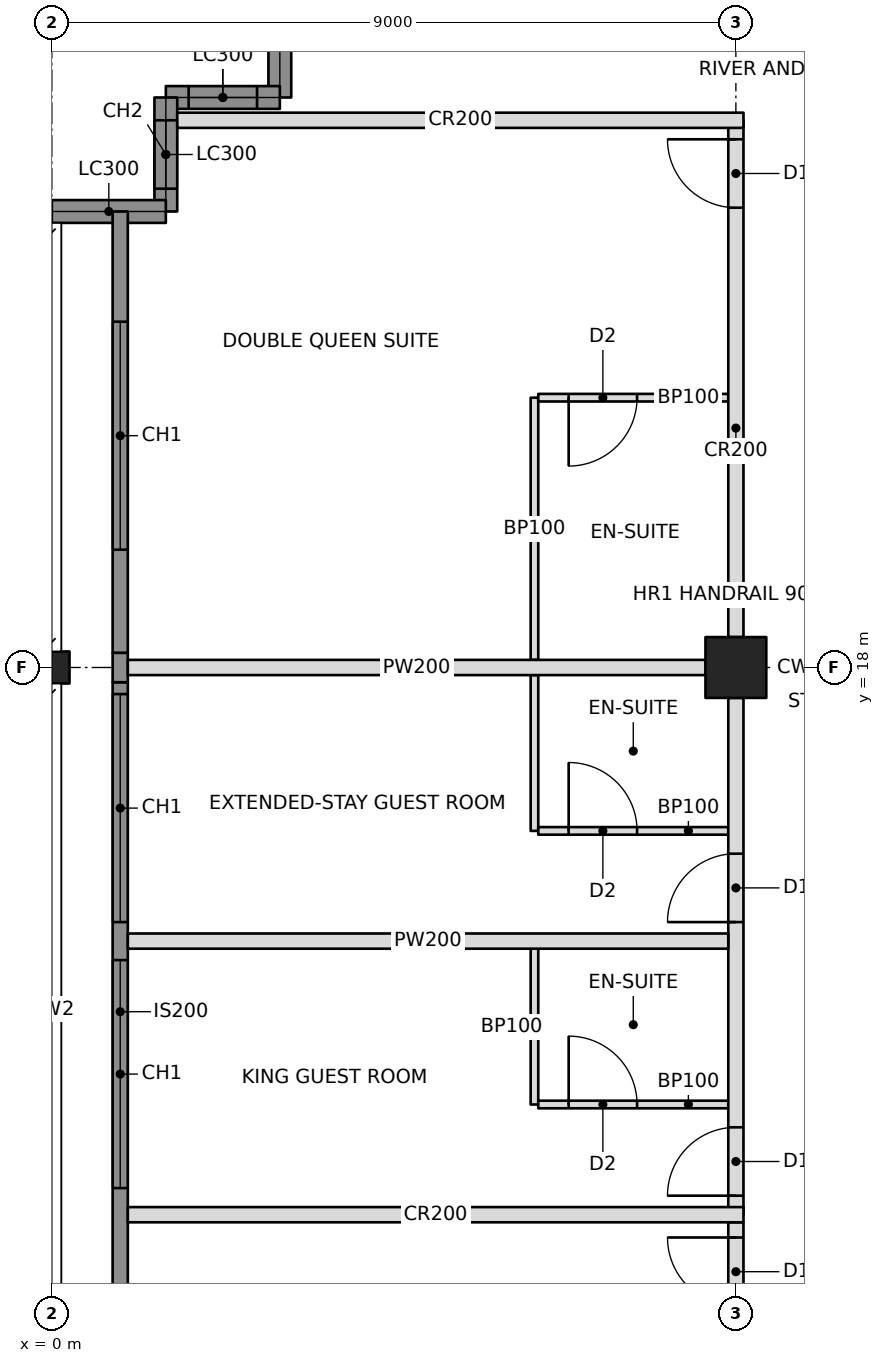
"""IFC4 building model, lengths in metres.
Left out: names, types, materials, properties, quantities, classifications, styles, units other than length and angle.
Written with IfcOpenShell. Run it as: python <this file> out.ifc"""

import sys

from ifc_helpers import new_model, si_unit, direction, frame, frame_2d, origin, origin_2d, place, context, subcontext, project, spatial, rectangle, hollow_rectangle, i_section, extrude, element, fill, save


model = new_model("IFC4")
c1 = context("Model", 3, precision=1e-05, world=origin(), true_north=direction((0.0, 1.0)))
c2 = subcontext(c1, "Body", "Model", "MODEL_VIEW")
j1 = project(units=[si_unit("LENGTHUNIT", "METRE"), si_unit("PLANEANGLEUNIT", "RADIAN")], contexts=[c1])
p1 = place(None, origin())
s1 = spatial("IfcSite", under=j1, at=p1, CompositionType="ELEMENT")
p2 = place(p1, origin())
s2 = spatial("IfcBuilding", under=s1, at=p2, CompositionType="ELEMENT")
p3 = place(p2, frame((0.0, 0.0, 233.8)))
s3 = spatial("IfcBuildingStorey", under=s2, at=p3, CompositionType="ELEMENT", Elevation=233.8)
p4 = place(p3, frame((0.0, 18.0, 0.0), z_axis=(0.0, 0.0, 1.0), x_axis=(0.0, 1.0, 0.0)))
e1 = element("IfcColumn", 1, at=p4, inside=s3, PredefinedType="COLUMN", context=c2, shape_type="SweptSolid", body=[
    extrude(i_section(OverallWidth=0.422, OverallDepth=0.465, WebThickness=0.045, FlangeThickness=0.073, at=origin_2d()), origin(), (0.0, 0.0, 1.0), 3.6),
])
p5 = place(p3, frame((9.0, 18.0, 0.0), z_axis=(0.0, 0.0, 1.0), x_axis=(1.0, 0.0, 0.0)))
e2 = element("IfcColumn", 2, at=p5, inside=s3, PredefinedType="COLUMN", context=c2, shape_type="SweptSolid", body=[
    extrude(hollow_rectangle(XDim=0.8, YDim=0.8, WallThickness=0.04, at=origin_2d()), origin(), (0.0, 0.0, 1.0), 3.6),
])
p6 = place(p3, frame((3.0, 27.0, 0.0), z_axis=(0.0, 0.0, 1.0), x_axis=(0.0, -1.0, 0.0)))
e3 = element("IfcWall", 3, at=p6, inside=s3, PredefinedType="SOLIDWALL", context=c2, shape_type="SweptSolid", body=[
    extrude(rectangle(XDim=1.5, YDim=0.3, at=frame_2d((0.75, 0.0))), origin(), (0.0, 0.0, 1.0), 2.62),
])
p7 = place(p3, frame((3.0, 25.5, 0.0), z_axis=(0.0, 0.0, 1.0), x_axis=(-1.0, 0.0, 0.0)))
e4 = element("IfcWall", 4, at=p7, inside=s3, PredefinedType="SOLIDWALL", context=c2, shape_type="SweptSolid", body=[
    extrude(rectangle(XDim=1.5, YDim=0.3, at=frame_2d((0.75, 0.0))), origin(), (0.0, 0.0, 1.0), 3.4),
])
p8 = place(p7, frame((0.3, 0.0, 0.6)))
e5 = element("IfcOpeningElement", 5, at=p8, cuts=e4, PredefinedType="OPENING", context=c2, shape_type="SweptSolid", body=[
    extrude(rectangle(XDim=0.9, YDim=2.2, at=frame_2d((0.45, 1.1))), frame((0.0, 0.16, 0.0), z_axis=(0.0, -1.0, 0.0), x_axis=(1.0, 0.0, 0.0)), (0.0, 0.0, 1.0), 0.32),
])
p9 = place(p3, frame((1.5, 25.5, 0.0), z_axis=(0.0, 0.0, 1.0), x_axis=(0.0, -1.0, 0.0)))
e6 = element("IfcWall", 6, at=p9, inside=s3, PredefinedType="SOLIDWALL", context=c2, shape_type="SweptSolid", body=[
    extrude(rectangle(XDim=1.5, YDim=0.3, at=frame_2d((0.75, 0.0))), origin(), (0.0, 0.0, 1.0), 3.4),
])
p10 = place(p9, frame((0.3, 0.0, 0.6)))
e7 = element("IfcOpeningElement", 7, at=p10, cuts=e6, PredefinedType="OPENING", context=c2, shape_type="SweptSolid", body=[
    extrude(rectangle(XDim=0.9, YDim=2.2, at=frame_2d((0.45, 1.1))), frame((0.0, 0.16, 0.0), z_axis=(0.0, -1.0, 0.0), x_axis=(1.0, 0.0, 0.0)), (0.0, 0.0, 1.0), 0.32),
])
p11 = place(p3, frame((1.5, 24.0, 0.0), z_axis=(0.0, 0.0, 1.0), x_axis=(-1.0, 0.0, 0.0)))
e8 = element("IfcWall", 8, at=p11, inside=s3, PredefinedType="SOLIDWALL", context=c2, shape_type="SweptSolid", body=[
    extrude(rectangle(XDim=1.5, YDim=0.3, at=frame_2d((0.75, 0.0))), origin(), (0.0, 0.0, 1.0), 2.62),
])
p12 = place(p3, frame((9.0, 10.8, 0.0), z_axis=(0.0, 0.0, 1.0), x_axis=(0.0, 1.0, 0.0)))
e9 = element("IfcWall", 9, at=p12, inside=s3, PredefinedType="PARTITIONING", context=c2, shape_type="SweptSolid", body=[
    extrude(rectangle(XDim=6.8, YDim=0.2, at=frame_2d((3.4, 0.0))), origin(), (0.0, 0.0, 1.0), 2.605),
])
p13 = place(p12, frame((0.25, 0.0, 0.0)))
e10 = element("IfcOpeningElement", 10, at=p13, cuts=e9, PredefinedType="OPENING", context=c2, shape_type="SweptSolid", body=[
    extrude(rectangle(XDim=0.9, YDim=2.1, at=frame_2d((0.45, 1.05))), frame((0.0, 0.11, 0.0), z_axis=(0.0, -1.0, 0.0), x_axis=(1.0, 0.0, 0.0)), (0.0, 0.0, 1.0), 0.22),
])
p14 = place(p12, frame((3.85, 0.0, 0.0)))
e11 = element("IfcOpeningElement", 11, at=p14, cuts=e9, PredefinedType="OPENING", context=c2, shape_type="SweptSolid", body=[
    extrude(rectangle(XDim=0.9, YDim=2.1, at=frame_2d((0.45, 1.05))), frame((0.0, 0.11, 0.0), z_axis=(0.0, -1.0, 0.0), x_axis=(1.0, 0.0, 0.0)), (0.0, 0.0, 1.0), 0.22),
])
p15 = place(p3, frame((9.0, 18.4, 0.0), z_axis=(0.0, 0.0, 1.0), x_axis=(0.0, 1.0, 0.0)))
e12 = element("IfcWall", 12, at=p15, inside=s3, PredefinedType="PARTITIONING", context=c2, shape_type="SweptSolid", body=[
    extrude(rectangle(XDim=6.8, YDim=0.2, at=frame_2d((3.4, 0.0))), origin(), (0.0, 0.0, 1.0), 2.605),
])
p16 = place(p15, frame((5.65, 0.0, 0.0)))
e13 = element("IfcOpeningElement", 13, at=p16, cuts=e12, PredefinedType="OPENING", context=c2, shape_type="SweptSolid", body=[
    extrude(rectangle(XDim=0.9, YDim=2.1, at=frame_2d((0.45, 1.05))), frame((0.0, 0.11, 0.0), z_axis=(0.0, -1.0, 0.0), x_axis=(1.0, 0.0, 0.0)), (0.0, 0.0, 1.0), 0.22),
])
p17 = place(p3, frame((1.0, 10.8, 0.0), z_axis=(0.0, 0.0, 1.0), x_axis=(1.0, 0.0, 0.0)))
e14 = element("IfcWall", 14, at=p17, inside=s3, PredefinedType="PARTITIONING", context=c2, shape_type="SweptSolid", body=[
    extrude(rectangle(XDim=8.1, YDim=0.2, at=frame_2d((4.05, 0.0))), origin(), (0.0, 0.0, 1.0), 2.604),
])
p18 = place(p3, frame((1.65, 25.2, 0.0), z_axis=(0.0, 0.0, 1.0), x_axis=(1.0, 0.0, 0.0)))
e15 = element("IfcWall", 15, at=p18, inside=s3, PredefinedType="PARTITIONING", context=c2, shape_type="SweptSolid", body=[
    extrude(rectangle(XDim=7.45, YDim=0.2, at=frame_2d((3.725, 0.0))), origin(), (0.0, 0.0, 1.0), 2.604),
])
p19 = place(p3, frame((8.9, 14.4, 0.0), z_axis=(0.0, 0.0, 1.0), x_axis=(-1.0, 0.0, 0.0)))
e16 = element("IfcWall", 16, at=p19, inside=s3, PredefinedType="PARTITIONING", context=c2, shape_type="SweptSolid", body=[
    extrude(rectangle(XDim=7.9, YDim=0.2, at=frame_2d((3.95, 0.0))), origin(), (0.0, 0.0, 1.0), 2.604),
])
p20 = place(p3, frame((8.6, 18.0, 0.0), z_axis=(0.0, 0.0, 1.0), x_axis=(-1.0, 0.0, 0.0)))
e17 = element("IfcWall", 17, at=p20, inside=s3, PredefinedType="PARTITIONING", context=c2, shape_type="SweptSolid", body=[
    extrude(rectangle(XDim=7.6, YDim=0.2, at=frame_2d((3.8, 0.0))), origin(), (0.0, 0.0, 1.0), 2.605),
])
p21 = place(p3, frame((6.35, 12.25, 0.0), z_axis=(0.0, 0.0, 1.0), x_axis=(0.0, 1.0, 0.0)))
e18 = element("IfcWall", 18, at=p21, inside=s3, PredefinedType="PARTITIONING", context=c2, shape_type="SweptSolid", body=[
    extrude(rectangle(XDim=2.05, YDim=0.1, at=frame_2d((1.025, 0.0))), origin(), (0.0, 0.0, 1.0), 3.4),
])
p22 = place(p3, frame((8.9, 12.25, 0.0), z_axis=(0.0, 0.0, 1.0), x_axis=(-1.0, 0.0, 0.0)))
e19 = element("IfcWall", 19, at=p22, inside=s3, PredefinedType="PARTITIONING", context=c2, shape_type="SweptSolid", body=[
    extrude(rectangle(XDim=2.5, YDim=0.1, at=frame_2d((1.25, 0.0))), origin(), (0.0, 0.0, 1.0), 2.604),
])
p23 = place(p22, frame((1.2, 0.0, 0.0)))
e20 = element("IfcOpeningElement", 20, at=p23, cuts=e19, PredefinedType="OPENING", context=c2, shape_type="SweptSolid", body=[
    extrude(rectangle(XDim=0.9, YDim=2.1, at=frame_2d((0.45, 1.05))), frame((0.0, 0.06, 0.0), z_axis=(0.0, -1.0, 0.0), x_axis=(1.0, 0.0, 0.0)), (0.0, 0.0, 1.0), 0.12),
])
p24 = place(p3, frame((6.35, 15.85, 0.0), z_axis=(0.0, 0.0, 1.0), x_axis=(0.0, 1.0, 0.0)))
e21 = element("IfcWall", 21, at=p24, inside=s3, PredefinedType="PARTITIONING", context=c2, shape_type="SweptSolid", body=[
    extrude(rectangle(XDim=2.05, YDim=0.1, at=frame_2d((1.025, 0.0))), origin(), (0.0, 0.0, 1.0), 2.604),
])
p25 = place(p3, frame((8.9, 15.85, 0.0), z_axis=(0.0, 0.0, 1.0), x_axis=(-1.0, 0.0, 0.0)))
e22 = element("IfcWall", 22, at=p25, inside=s3, PredefinedType="PARTITIONING", context=c2, shape_type="SweptSolid", body=[
    extrude(rectangle(XDim=2.5, YDim=0.1, at=frame_2d((1.25, 0.0))), origin(), (0.0, 0.0, 1.0), 2.604),
])
p26 = place(p25, frame((1.2, 0.0, 0.0)))
e23 = element("IfcOpeningElement", 23, at=p26, cuts=e22, PredefinedType="OPENING", context=c2, shape_type="SweptSolid", body=[
    extrude(rectangle(XDim=0.9, YDim=2.1, at=frame_2d((0.45, 1.05))), frame((0.0, 0.06, 0.0), z_axis=(0.0, -1.0, 0.0), x_axis=(1.0, 0.0, 0.0)), (0.0, 0.0, 1.0), 0.12),
])
p27 = place(p3, frame((6.35, 18.1, 0.0), z_axis=(0.0, 0.0, 1.0), x_axis=(0.0, 1.0, 0.0)))
e24 = element("IfcWall", 24, at=p27, inside=s3, PredefinedType="PARTITIONING", context=c2, shape_type="SweptSolid", body=[
    extrude(rectangle(XDim=3.45, YDim=0.1, at=frame_2d((1.725, 0.0))), origin(), (0.0, 0.0, 1.0), 2.604),
])
p28 = place(p3, frame((8.9, 21.55, 0.0), z_axis=(0.0, 0.0, 1.0), x_axis=(-1.0, 0.0, 0.0)))
e25 = element("IfcWall", 25, at=p28, inside=s3, PredefinedType="PARTITIONING", context=c2, shape_type="SweptSolid", body=[
    extrude(rectangle(XDim=2.5, YDim=0.1, at=frame_2d((1.25, 0.0))), origin(), (0.0, 0.0, 1.0), 2.604),
])
p29 = place(p28, frame((1.2, 0.0, 0.0)))
e26 = element("IfcOpeningElement", 26, at=p29, cuts=e25, PredefinedType="OPENING", context=c2, shape_type="SweptSolid", body=[
    extrude(rectangle(XDim=0.9, YDim=2.1, at=frame_2d((0.45, 1.05))), frame((0.0, 0.06, 0.0), z_axis=(0.0, -1.0, 0.0), x_axis=(1.0, 0.0, 0.0)), (0.0, 0.0, 1.0), 0.12),
])
p30 = place(p3, frame((9.0, 9.4, 0.0), z_axis=(0.0, 0.0, 1.0), x_axis=(0.0, 1.0, 0.0)))
e27 = element("IfcWall", 27, at=p30, inside=s3, PredefinedType="PARTITIONING", context=c2, shape_type="SweptSolid", body=[
    extrude(rectangle(XDim=1.3, YDim=0.2, at=frame_2d((0.65, 0.0))), origin(), (0.0, 0.0, 1.0), 2.605),
])
p31 = place(p30, frame((0.2, 0.0, 0.0)))
e28 = element("IfcOpeningElement", 28, at=p31, cuts=e27, PredefinedType="OPENING", context=c2, shape_type="SweptSolid", body=[
    extrude(rectangle(XDim=0.9, YDim=2.1, at=frame_2d((0.45, 1.05))), frame((0.0, 0.11, 0.0), z_axis=(0.0, -1.0, 0.0), x_axis=(1.0, 0.0, 0.0)), (0.0, 0.0, 1.0), 0.22),
])
p32 = place(p3, frame((0.9, 9.135, 0.0), z_axis=(0.0, 0.0, 1.0), x_axis=(0.0, 1.0, 0.0)))
e29 = element("IfcWall", 29, at=p32, inside=s3, PredefinedType="SOLIDWALL", context=c2, shape_type="SweptSolid", body=[
    extrude(rectangle(XDim=8.671, YDim=0.2, at=frame_2d((4.335, 0.0))), origin(), (0.0, 0.0, 1.0), 3.4),
])
p33 = place(p32, frame((2.015, 0.0, 0.6)))
e30 = element("IfcOpeningElement", 30, at=p33, cuts=e29, PredefinedType="OPENING", context=c2, shape_type="SweptSolid", body=[
    extrude(rectangle(XDim=3.0, YDim=2.2, at=frame_2d((1.5, 1.1))), frame((0.0, 0.11, 0.0), z_axis=(0.0, -1.0, 0.0), x_axis=(1.0, 0.0, 0.0)), (0.0, 0.0, 1.0), 0.22),
])
p34 = place(p32, frame((5.515, 0.0, 0.6)))
e31 = element("IfcOpeningElement", 31, at=p34, cuts=e29, PredefinedType="OPENING", context=c2, shape_type="SweptSolid", body=[
    extrude(rectangle(XDim=3.0, YDim=2.2, at=frame_2d((1.5, 1.1))), frame((0.0, 0.11, 0.0), z_axis=(0.0, -1.0, 0.0), x_axis=(1.0, 0.0, 0.0)), (0.0, 0.0, 1.0), 0.22),
])
p35 = place(p3, frame((0.9, 17.806, 0.0), z_axis=(0.0, 0.0, 1.0), x_axis=(0.0, 1.0, 0.0)))
e32 = element("IfcWall", 32, at=p35, inside=s3, PredefinedType="SOLIDWALL", context=c2, shape_type="SweptSolid", body=[
    extrude(rectangle(XDim=0.388, YDim=0.2, at=frame_2d((0.194, 0.0))), origin(), (0.0, 0.0, 1.0), 2.604),
])
p36 = place(p3, frame((0.9, 18.194, 0.0), z_axis=(0.0, 0.0, 1.0), x_axis=(0.0, 1.0, 0.0)))
e33 = element("IfcWall", 33, at=p36, inside=s3, PredefinedType="SOLIDWALL", context=c2, shape_type="SweptSolid", body=[
    extrude(rectangle(XDim=5.806, YDim=0.2, at=frame_2d((2.903, 0.0))), origin(), (0.0, 0.0, 1.0), 3.4),
])
p37 = place(p36, frame((1.356, 0.0, 0.6)))
e34 = element("IfcOpeningElement", 34, at=p37, cuts=e33, PredefinedType="OPENING", context=c2, shape_type="SweptSolid", body=[
    extrude(rectangle(XDim=3.0, YDim=2.2, at=frame_2d((1.5, 1.1))), frame((0.0, 0.11, 0.0), z_axis=(0.0, -1.0, 0.0), x_axis=(1.0, 0.0, 0.0)), (0.0, 0.0, 1.0), 0.22),
])
p38 = place(p8, origin())
e35 = element("IfcWindow", 35, at=p38, inside=s3, PartitioningType="SINGLE_PANEL", PredefinedType="WINDOW", context=c2, shape_type="SweptSolid", body=[
    extrude(rectangle(XDim=0.9, YDim=2.2, at=frame_2d((0.45, 1.1))), frame((0.0, 0.03, 0.0), z_axis=(0.0, -1.0, 0.0), x_axis=(1.0, 0.0, 0.0)), (0.0, 0.0, 1.0), 0.06),
])
fill(e5, e35)
p39 = place(p10, origin())
e36 = element("IfcWindow", 36, at=p39, inside=s3, PartitioningType="SINGLE_PANEL", PredefinedType="WINDOW", context=c2, shape_type="SweptSolid", body=[
    extrude(rectangle(XDim=0.9, YDim=2.2, at=frame_2d((0.45, 1.1))), frame((0.0, 0.03, 0.0), z_axis=(0.0, -1.0, 0.0), x_axis=(1.0, 0.0, 0.0)), (0.0, 0.0, 1.0), 0.06),
])
fill(e7, e36)
p40 = place(p33, origin())
e37 = element("IfcWindow", 37, at=p40, inside=s3, PartitioningType="TRIPLE_PANEL_VERTICAL", PredefinedType="WINDOW", context=c2, shape_type="SweptSolid", body=[
    extrude(rectangle(XDim=3.0, YDim=2.2, at=frame_2d((1.5, 1.1))), frame((0.0, 0.03, 0.0), z_axis=(0.0, -1.0, 0.0), x_axis=(1.0, 0.0, 0.0)), (0.0, 0.0, 1.0), 0.06),
])
fill(e30, e37)
p41 = place(p34, origin())
e38 = element("IfcWindow", 38, at=p41, inside=s3, PartitioningType="TRIPLE_PANEL_VERTICAL", PredefinedType="WINDOW", context=c2, shape_type="SweptSolid", body=[
    extrude(rectangle(XDim=3.0, YDim=2.2, at=frame_2d((1.5, 1.1))), frame((0.0, 0.03, 0.0), z_axis=(0.0, -1.0, 0.0), x_axis=(1.0, 0.0, 0.0)), (0.0, 0.0, 1.0), 0.06),
])
fill(e31, e38)
p42 = place(p37, origin())
e39 = element("IfcWindow", 39, at=p42, inside=s3, PartitioningType="TRIPLE_PANEL_VERTICAL", PredefinedType="WINDOW", context=c2, shape_type="SweptSolid", body=[
    extrude(rectangle(XDim=3.0, YDim=2.2, at=frame_2d((1.5, 1.1))), frame((0.0, 0.03, 0.0), z_axis=(0.0, -1.0, 0.0), x_axis=(1.0, 0.0, 0.0)), (0.0, 0.0, 1.0), 0.06),
])
fill(e34, e39)
p43 = place(p23, frame((0.9, 0.0, 0.0), z_axis=(0.0, 0.0, 1.0), x_axis=(-1.0, 0.0, 0.0)))
e40 = element("IfcDoor", 40, at=p43, inside=s3, OperationType="SINGLE_SWING_LEFT", PredefinedType="DOOR", context=c2, shape_type="SweptSolid", body=[
    extrude(rectangle(XDim=0.9, YDim=2.1, at=frame_2d((0.45, 1.05))), frame((0.0, 0.025, 0.0), z_axis=(0.0, -1.0, 0.0), x_axis=(1.0, 0.0, 0.0)), (0.0, 0.0, 1.0), 0.05),
])
fill(e20, e40)
p44 = place(p13, origin())
e41 = element("IfcDoor", 41, at=p44, inside=s3, OperationType="SINGLE_SWING_LEFT", PredefinedType="DOOR", context=c2, shape_type="SweptSolid", body=[
    extrude(rectangle(XDim=0.9, YDim=2.1, at=frame_2d((0.45, 1.05))), frame((0.0, 0.025, 0.0), z_axis=(0.0, -1.0, 0.0), x_axis=(1.0, 0.0, 0.0)), (0.0, 0.0, 1.0), 0.05),
])
fill(e10, e41)
p45 = place(p26, frame((0.9, 0.0, 0.0), z_axis=(0.0, 0.0, 1.0), x_axis=(-1.0, 0.0, 0.0)))
e42 = element("IfcDoor", 42, at=p45, inside=s3, OperationType="SINGLE_SWING_LEFT", PredefinedType="DOOR", context=c2, shape_type="SweptSolid", body=[
    extrude(rectangle(XDim=0.9, YDim=2.1, at=frame_2d((0.45, 1.05))), frame((0.0, 0.025, 0.0), z_axis=(0.0, -1.0, 0.0), x_axis=(1.0, 0.0, 0.0)), (0.0, 0.0, 1.0), 0.05),
])
fill(e23, e42)
p46 = place(p14, origin())
e43 = element("IfcDoor", 43, at=p46, inside=s3, OperationType="SINGLE_SWING_LEFT", PredefinedType="DOOR", context=c2, shape_type="SweptSolid", body=[
    extrude(rectangle(XDim=0.9, YDim=2.1, at=frame_2d((0.45, 1.05))), frame((0.0, 0.025, 0.0), z_axis=(0.0, -1.0, 0.0), x_axis=(1.0, 0.0, 0.0)), (0.0, 0.0, 1.0), 0.05),
])
fill(e11, e43)
p47 = place(p29, origin())
e44 = element("IfcDoor", 44, at=p47, inside=s3, OperationType="SINGLE_SWING_RIGHT", PredefinedType="DOOR", context=c2, shape_type="SweptSolid", body=[
    extrude(rectangle(XDim=0.9, YDim=2.1, at=frame_2d((0.45, 1.05))), frame((0.0, 0.025, 0.0), z_axis=(0.0, -1.0, 0.0), x_axis=(1.0, 0.0, 0.0)), (0.0, 0.0, 1.0), 0.05),
])
fill(e26, e44)
p48 = place(p16, origin())
e45 = element("IfcDoor", 45, at=p48, inside=s3, OperationType="SINGLE_SWING_RIGHT", PredefinedType="DOOR", context=c2, shape_type="SweptSolid", body=[
    extrude(rectangle(XDim=0.9, YDim=2.1, at=frame_2d((0.45, 1.05))), frame((0.0, 0.025, 0.0), z_axis=(0.0, -1.0, 0.0), x_axis=(1.0, 0.0, 0.0)), (0.0, 0.0, 1.0), 0.05),
])
fill(e13, e45)
p49 = place(p31, origin())
e46 = element("IfcDoor", 46, at=p49, inside=s3, OperationType="SINGLE_SWING_RIGHT", PredefinedType="DOOR", context=c2, shape_type="SweptSolid", body=[
    extrude(rectangle(XDim=0.9, YDim=2.1, at=frame_2d((0.45, 1.05))), frame((0.0, 0.025, 0.0), z_axis=(0.0, -1.0, 0.0), x_axis=(1.0, 0.0, 0.0)), (0.0, 0.0, 1.0), 0.05),
])
fill(e28, e46)
save(model, sys.argv[1])
